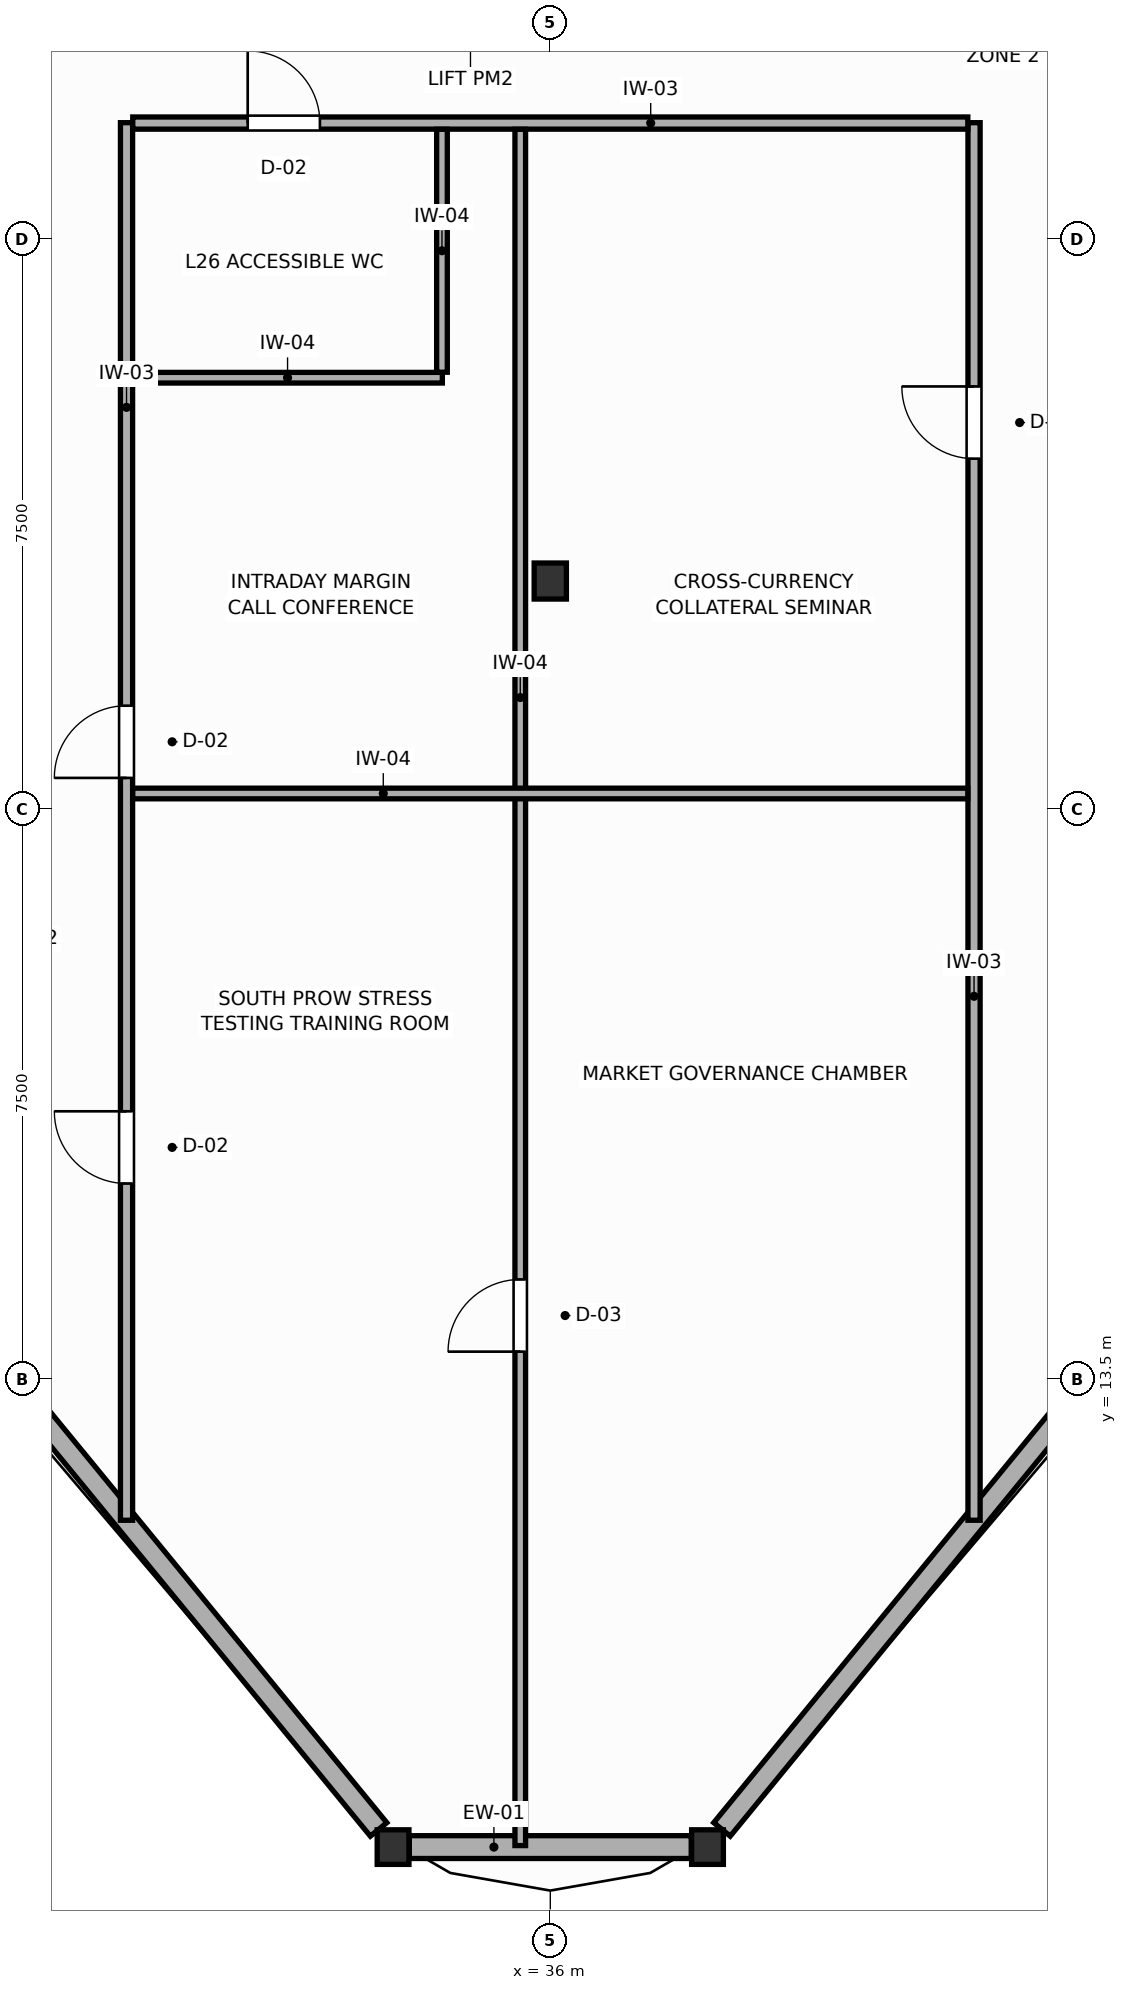
"""IFC4 building model, lengths in metres.
Left out: names, types, materials, properties, quantities, classifications, styles, units other than length and angle.
Written with IfcOpenShell. Run it as: python <this file> out.ifc"""

import sys

from ifc_helpers import new_model, si_unit, direction, frame, frame_2d, origin, origin_2d, place, context, subcontext, project, spatial, rectangle, i_section, extrude, source, transform, mapped, element, fill, save


model = new_model("IFC4")
c1 = context("Model", 3, precision=1e-05, world=origin(), true_north=direction((0.0, 1.0)))
c2 = subcontext(c1, "Body", "Model", "MODEL_VIEW")
j1 = project(units=[si_unit("LENGTHUNIT", "METRE"), si_unit("PLANEANGLEUNIT", "RADIAN")], contexts=[c1])
p1 = place(None, origin())
s1 = spatial("IfcSite", under=j1, at=p1, CompositionType="ELEMENT")
p2 = place(p1, origin())
s2 = spatial("IfcBuilding", under=s1, at=p2, CompositionType="ELEMENT")
p3 = place(p2, frame((0.0, 0.0, 106.2)))
s3 = spatial("IfcBuildingStorey", under=s2, at=p3, CompositionType="ELEMENT", Elevation=106.2)
m1 = source(origin(), c2, "Body", "SweptSolid", [
    extrude(i_section(OverallWidth=0.424, OverallDepth=0.474, WebThickness=0.045, FlangeThickness=0.072, FilletRadius=0.015, at=origin_2d()), origin(), (0.0, 0.0, 1.0), 3.6),
])
p4 = place(p3, frame((36.0, 24.0, 0.0), z_axis=(0.0, 0.0, 1.0), x_axis=(1.0, 0.0, 0.0)))
e1 = element("IfcColumn", 1, at=p4, inside=s3, PredefinedType="COLUMN", context=c2, shape_type="MappedRepresentation", body=[
    mapped(m1, transform((0.0, 0.0, 0.0), scale=1.0)),
])
m2 = source(origin(), c2, "Body", "SweptSolid", [
    extrude(i_section(OverallWidth=0.418, OverallDepth=0.455, WebThickness=0.039, FlangeThickness=0.063, FilletRadius=0.015, at=origin_2d()), origin(), (0.0, 0.0, 1.0), 3.6),
])
for number, where, z_axis, x_axis in (
    (2, (33.932, 7.344, 0.0), (0.0, 0.0, 1.0), (1.0, 0.0, 0.0)),
    (3, (38.068, 7.344, 0.0), (0.0, 0.0, 1.0), (1.0, 0.0, 0.0)),
):
    element("IfcColumn", number, at=place(p3, frame(where, z_axis=z_axis, x_axis=x_axis)), inside=s3, PredefinedType="COLUMN", context=c2, shape_type="MappedRepresentation", body=[
        mapped(m2, transform((0.0, 0.0, 0.0), scale=1.0)),
    ])
p5 = place(p3, frame((23.439, 20.15, 0.0), z_axis=(0.0, 0.0, 1.0), x_axis=(0.633768446385, -0.773522822137, 0.0)))
e4 = element("IfcWall", 4, at=p5, inside=s3, PredefinedType="SOLIDWALL", context=c2, shape_type="SweptSolid", body=[
    extrude(rectangle(XDim=16.255, YDim=0.28, at=frame_2d((8.127, 0.0))), origin(), (0.0, 0.0, 1.0), 1.87),
])
p6 = place(p3, frame((34.146, 7.344, 0.0), z_axis=(0.0, 0.0, 1.0), x_axis=(1.0, 0.0, 0.0)))
e5 = element("IfcWall", 5, at=p6, inside=s3, PredefinedType="SOLIDWALL", context=c2, shape_type="SweptSolid", body=[
    extrude(rectangle(XDim=3.709, YDim=0.3, at=frame_2d((1.854, 0.0))), origin(), (0.0, 0.0, 1.0), 1.87),
])
p7 = place(p3, frame((38.259, 7.576, 0.0), z_axis=(0.0, 0.0, 1.0), x_axis=(0.633768446385, 0.773522822137, 0.0)))
e6 = element("IfcWall", 6, at=p7, inside=s3, PredefinedType="SOLIDWALL", context=c2, shape_type="SweptSolid", body=[
    extrude(rectangle(XDim=16.255, YDim=0.28, at=frame_2d((8.127, 0.0))), origin(), (0.0, 0.0, 1.0), 1.87),
])
p8 = place(p3, frame((30.425, 11.644, 0.0), z_axis=(0.0, 0.0, 1.0), x_axis=(0.0, 1.0, 0.0)))
e7 = element("IfcWall", 7, at=p8, inside=s3, PredefinedType="PARTITIONING", context=c2, shape_type="SweptSolid", body=[
    extrude(rectangle(XDim=18.386, YDim=0.16, at=frame_2d((9.193, 0.0))), origin(), (0.0, 0.0, 1.0), 3.4),
])
p9 = place(p8, frame((4.43, 0.0, 0.0)))
e8 = element("IfcOpeningElement", 8, at=p9, cuts=e7, PredefinedType="OPENING", context=c2, shape_type="SweptSolid", body=[
    extrude(rectangle(XDim=0.95, YDim=2.05, at=frame_2d((0.475, 1.025))), frame((0.0, 0.09, 0.0), z_axis=(0.0, -1.0, 0.0), x_axis=(1.0, 0.0, 0.0)), (0.0, 0.0, 1.0), 0.18),
])
p10 = place(p8, frame((9.766, 0.0, 0.0)))
e9 = element("IfcOpeningElement", 9, at=p10, cuts=e7, PredefinedType="OPENING", context=c2, shape_type="SweptSolid", body=[
    extrude(rectangle(XDim=0.95, YDim=2.05, at=frame_2d((0.475, 1.025))), frame((0.0, 0.09, 0.0), z_axis=(0.0, -1.0, 0.0), x_axis=(1.0, 0.0, 0.0)), (0.0, 0.0, 1.0), 0.18),
])
p11 = place(p3, frame((41.575, 11.644, 0.0), z_axis=(0.0, 0.0, 1.0), x_axis=(0.0, 1.0, 0.0)))
e10 = element("IfcWall", 10, at=p11, inside=s3, PredefinedType="PARTITIONING", context=c2, shape_type="SweptSolid", body=[
    extrude(rectangle(XDim=18.386, YDim=0.16, at=frame_2d((9.193, 0.0))), origin(), (0.0, 0.0, 1.0), 3.4),
])
p12 = place(p11, frame((13.966, 0.0, 0.0)))
e11 = element("IfcOpeningElement", 11, at=p12, cuts=e10, PredefinedType="OPENING", context=c2, shape_type="SweptSolid", body=[
    extrude(rectangle(XDim=0.95, YDim=2.05, at=frame_2d((0.475, 1.025))), frame((0.0, 0.09, 0.0), z_axis=(0.0, -1.0, 0.0), x_axis=(1.0, 0.0, 0.0)), (0.0, 0.0, 1.0), 0.18),
])
p13 = place(p3, frame((30.507, 30.025, 0.0), z_axis=(0.0, 0.0, 1.0), x_axis=(1.0, 0.0, 0.0)))
e12 = element("IfcWall", 12, at=p13, inside=s3, PredefinedType="PARTITIONING", context=c2, shape_type="SweptSolid", body=[
    extrude(rectangle(XDim=10.986, YDim=0.16, at=frame_2d((5.493, 0.0))), origin(), (0.0, 0.0, 1.0), 3.4),
])
p14 = place(p13, frame((1.512, 0.0, 0.0)))
e13 = element("IfcOpeningElement", 13, at=p14, cuts=e12, PredefinedType="OPENING", context=c2, shape_type="SweptSolid", body=[
    extrude(rectangle(XDim=0.95, YDim=2.05, at=frame_2d((0.475, 1.025))), frame((0.0, 0.09, 0.0), z_axis=(0.0, -1.0, 0.0), x_axis=(1.0, 0.0, 0.0)), (0.0, 0.0, 1.0), 0.18),
])
p15 = place(p3, frame((35.605, 7.364, 0.0), z_axis=(0.0, 0.0, 1.0), x_axis=(0.0, 1.0, 0.0)))
e14 = element("IfcWall", 14, at=p15, inside=s3, PredefinedType="PARTITIONING", context=c2, shape_type="SweptSolid", body=[
    extrude(rectangle(XDim=22.579, YDim=0.14, at=frame_2d((11.29, 0.0))), origin(), (0.0, 0.0, 1.0), 2.16),
])
p16 = place(p15, frame((6.498, 0.0, 0.0)))
e15 = element("IfcOpeningElement", 15, at=p16, cuts=e14, PredefinedType="OPENING", context=c2, shape_type="SweptSolid", body=[
    extrude(rectangle(XDim=0.95, YDim=2.05, at=frame_2d((0.475, 1.025))), frame((0.0, 0.08, 0.0), z_axis=(0.0, -1.0, 0.0), x_axis=(1.0, 0.0, 0.0)), (0.0, 0.0, 1.0), 0.16),
])
p17 = place(p3, frame((30.507, 21.205, 0.0), z_axis=(0.0, 0.0, 1.0), x_axis=(1.0, 0.0, 0.0)))
e16 = element("IfcWall", 16, at=p17, inside=s3, PredefinedType="PARTITIONING", context=c2, shape_type="SweptSolid", body=[
    extrude(rectangle(XDim=10.986, YDim=0.14, at=frame_2d((5.493, 0.0))), origin(), (0.0, 0.0, 1.0), 3.4),
])
p18 = place(p3, frame((30.507, 26.675, 0.0), z_axis=(0.0, 0.0, 1.0), x_axis=(1.0, 0.0, 0.0)))
e17 = element("IfcWall", 17, at=p18, inside=s3, PredefinedType="PARTITIONING", context=c2, shape_type="SweptSolid", body=[
    extrude(rectangle(XDim=4.073, YDim=0.14, at=frame_2d((2.037, 0.0))), origin(), (0.0, 0.0, 1.0), 3.4),
])
p19 = place(p3, frame((34.575, 26.747, 0.0), z_axis=(0.0, 0.0, 1.0), x_axis=(0.0, 1.0, 0.0)))
e18 = element("IfcWall", 18, at=p19, inside=s3, PredefinedType="PARTITIONING", context=c2, shape_type="SweptSolid", body=[
    extrude(rectangle(XDim=3.196, YDim=0.14, at=frame_2d((1.598, 0.0))), origin(), (0.0, 0.0, 1.0), 3.4),
])
p20 = place(p9, origin())
e19 = element("IfcDoor", 19, at=p20, inside=s3, OperationType="SINGLE_SWING_RIGHT", PredefinedType="DOOR", context=c2, shape_type="SweptSolid", body=[
    extrude(rectangle(XDim=0.95, YDim=2.05, at=frame_2d((0.475, 1.025))), frame((0.0, 0.025, 0.0), z_axis=(0.0, -1.0, 0.0), x_axis=(1.0, 0.0, 0.0)), (0.0, 0.0, 1.0), 0.05),
])
fill(e8, e19)
p21 = place(p10, origin())
e20 = element("IfcDoor", 20, at=p21, inside=s3, OperationType="SINGLE_SWING_LEFT", PredefinedType="DOOR", context=c2, shape_type="SweptSolid", body=[
    extrude(rectangle(XDim=0.95, YDim=2.05, at=frame_2d((0.475, 1.025))), frame((0.0, 0.025, 0.0), z_axis=(0.0, -1.0, 0.0), x_axis=(1.0, 0.0, 0.0)), (0.0, 0.0, 1.0), 0.05),
])
fill(e9, e20)
p22 = place(p12, origin())
e21 = element("IfcDoor", 21, at=p22, inside=s3, OperationType="SINGLE_SWING_RIGHT", PredefinedType="DOOR", context=c2, shape_type="SweptSolid", body=[
    extrude(rectangle(XDim=0.95, YDim=2.05, at=frame_2d((0.475, 1.025))), frame((0.0, 0.025, 0.0), z_axis=(0.0, -1.0, 0.0), x_axis=(1.0, 0.0, 0.0)), (0.0, 0.0, 1.0), 0.05),
])
fill(e11, e21)
p23 = place(p14, origin())
e22 = element("IfcDoor", 22, at=p23, inside=s3, OperationType="SINGLE_SWING_LEFT", PredefinedType="DOOR", context=c2, shape_type="SweptSolid", body=[
    extrude(rectangle(XDim=0.95, YDim=2.05, at=frame_2d((0.475, 1.025))), frame((0.0, 0.025, 0.0), z_axis=(0.0, -1.0, 0.0), x_axis=(1.0, 0.0, 0.0)), (0.0, 0.0, 1.0), 0.05),
])
fill(e13, e22)
p24 = place(p16, origin())
e23 = element("IfcDoor", 23, at=p24, inside=s3, OperationType="SINGLE_SWING_LEFT", PredefinedType="DOOR", context=c2, shape_type="SweptSolid", body=[
    extrude(rectangle(XDim=0.95, YDim=2.05, at=frame_2d((0.475, 1.025))), frame((0.0, 0.025, 0.0), z_axis=(0.0, -1.0, 0.0), x_axis=(1.0, 0.0, 0.0)), (0.0, 0.0, 1.0), 0.05),
])
fill(e15, e23)
save(model, sys.argv[1])
